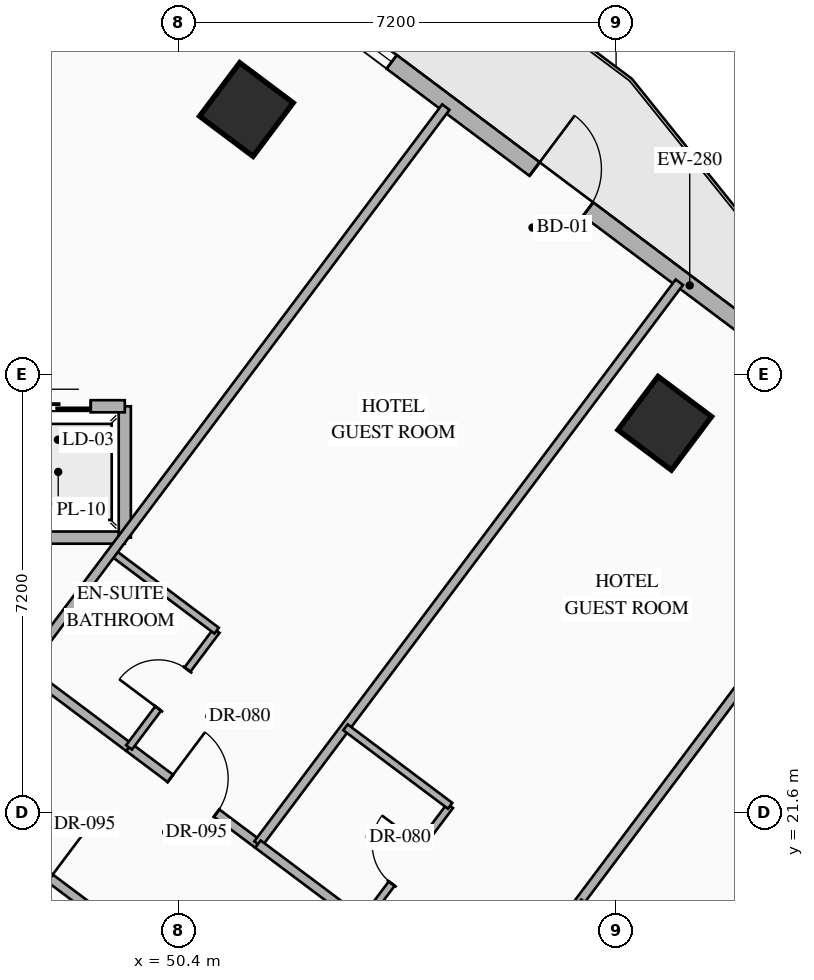
"""IFC4 building model, lengths in metres.
Left out: names, types, materials, properties, quantities, classifications, styles, units other than length and angle.
Written with IfcOpenShell. Run it as: python <this file> out.ifc"""

import sys

from ifc_helpers import new_model, si_unit, direction, frame, frame_2d, origin, origin_2d, place, context, subcontext, project, spatial, rectangle, hollow_rectangle, extrude, element, fill, save


model = new_model("IFC4")
c1 = context("Model", 3, precision=1e-05, world=origin(), true_north=direction((0.0, 1.0)))
c2 = subcontext(c1, "Body", "Model", "MODEL_VIEW")
j1 = project(units=[si_unit("LENGTHUNIT", "METRE"), si_unit("PLANEANGLEUNIT", "RADIAN")], contexts=[c1])
p1 = place(None, origin())
s1 = spatial("IfcSite", under=j1, at=p1, CompositionType="ELEMENT")
p2 = place(p1, origin())
s2 = spatial("IfcBuilding", under=s1, at=p2, CompositionType="ELEMENT")
p3 = place(p2, frame((0.0, 0.0, 63.4)))
s3 = spatial("IfcBuildingStorey", under=s2, at=p3, CompositionType="ELEMENT", Elevation=63.4)
for number, where, z_axis, x_axis in (
    (1, (51.52, 33.16, 0.0), (0.0, 0.0, 1.0), (0.8, -0.6, 0.0)),
    (2, (58.4, 28.0, 0.0), (0.0, 0.0, 1.0), (0.8, -0.6, 0.0)),
):
    element("IfcColumn", number, at=place(p3, frame(where, z_axis=z_axis, x_axis=x_axis)), inside=s3, PredefinedType="COLUMN", context=c2, shape_type="SweptSolid", body=[
        extrude(hollow_rectangle(XDim=1.1, YDim=1.1, WallThickness=0.04, at=origin_2d()), origin(), (0.0, 0.0, 1.0), 3.35),
    ])
p4 = place(p3, frame((44.86, 40.73, 0.0), z_axis=(0.0, 0.0, 1.0), x_axis=(0.800006902154, -0.599990797017, 0.0)))
e3 = element("IfcWall", 3, at=p4, inside=s3, PredefinedType="STANDARD", context=c2, shape_type="SweptSolid", body=[
    extrude(rectangle(XDim=29.712, YDim=0.28, at=frame_2d((14.856, 0.0))), origin(), (0.0, 0.0, 1.0), 3.13),
])
p5 = place(p4, frame((14.249, 0.0, 0.0)))
e4 = element("IfcOpeningElement", 4, at=p5, cuts=e3, PredefinedType="OPENING", context=c2, shape_type="SweptSolid", body=[
    extrude(rectangle(XDim=1.1, YDim=2.2, at=frame_2d((0.55, 1.1))), frame((0.0, 0.15, 0.0), z_axis=(0.0, -1.0, 0.0), x_axis=(1.0, 0.0, 0.0)), (0.0, 0.0, 1.0), 0.3),
])
p6 = place(p4, frame((1.612, 0.0, 0.85)))
e5 = element("IfcOpeningElement", 5, at=p6, cuts=e3, PredefinedType="OPENING", context=c2, shape_type="SweptSolid", body=[
    extrude(rectangle(XDim=1.4, YDim=1.8, at=frame_2d((0.7, 0.9))), frame((0.0, 0.15, 0.0), z_axis=(0.0, -1.0, 0.0), x_axis=(1.0, 0.0, 0.0)), (0.0, 0.0, 1.0), 0.3),
])
p7 = place(p4, frame((5.667, 0.0, 0.85)))
e6 = element("IfcOpeningElement", 6, at=p7, cuts=e3, PredefinedType="OPENING", context=c2, shape_type="SweptSolid", body=[
    extrude(rectangle(XDim=1.4, YDim=1.8, at=frame_2d((0.7, 0.9))), frame((0.0, 0.15, 0.0), z_axis=(0.0, -1.0, 0.0), x_axis=(1.0, 0.0, 0.0)), (0.0, 0.0, 1.0), 0.3),
])
p8 = place(p4, frame((9.912, 0.0, 0.85)))
e7 = element("IfcOpeningElement", 7, at=p8, cuts=e3, PredefinedType="OPENING", context=c2, shape_type="SweptSolid", body=[
    extrude(rectangle(XDim=1.4, YDim=1.8, at=frame_2d((0.7, 0.9))), frame((0.0, 0.15, 0.0), z_axis=(0.0, -1.0, 0.0), x_axis=(1.0, 0.0, 0.0)), (0.0, 0.0, 1.0), 0.3),
])
p9 = place(p4, frame((19.528, 0.0, 0.85)))
e8 = element("IfcOpeningElement", 8, at=p9, cuts=e3, PredefinedType="OPENING", context=c2, shape_type="SweptSolid", body=[
    extrude(rectangle(XDim=1.4, YDim=1.8, at=frame_2d((0.7, 0.9))), frame((0.0, 0.15, 0.0), z_axis=(0.0, -1.0, 0.0), x_axis=(1.0, 0.0, 0.0)), (0.0, 0.0, 1.0), 0.3),
])
p10 = place(p4, frame((23.451, 0.0, 0.85)))
e9 = element("IfcOpeningElement", 9, at=p10, cuts=e3, PredefinedType="OPENING", context=c2, shape_type="SweptSolid", body=[
    extrude(rectangle(XDim=1.4, YDim=1.8, at=frame_2d((0.7, 0.9))), frame((0.0, 0.15, 0.0), z_axis=(0.0, -1.0, 0.0), x_axis=(1.0, 0.0, 0.0)), (0.0, 0.0, 1.0), 0.3),
])
p11 = place(p4, frame((27.852, 0.0, 0.85)))
e10 = element("IfcOpeningElement", 10, at=p11, cuts=e3, PredefinedType="OPENING", context=c2, shape_type="SweptSolid", body=[
    extrude(rectangle(XDim=1.4, YDim=1.8, at=frame_2d((0.7, 0.9))), frame((0.0, 0.15, 0.0), z_axis=(0.0, -1.0, 0.0), x_axis=(1.0, 0.0, 0.0)), (0.0, 0.0, 1.0), 0.3),
])
p12 = place(p3, frame((45.12, 26.12, 0.0), z_axis=(0.0, 0.0, 1.0), x_axis=(1.0, 0.0, 0.0)))
e11 = element("IfcWall", 11, at=p12, inside=s3, PredefinedType="STANDARD", context=c2, shape_type="SweptSolid", body=[
    extrude(rectangle(XDim=4.4, YDim=0.2, at=frame_2d((2.2, 0.0))), origin(), (0.0, 0.0, 1.0), 3.13),
])
p13 = place(p3, frame((49.52, 26.12, 0.0), z_axis=(0.0, 0.0, 1.0), x_axis=(0.0, 1.0, 0.0)))
e12 = element("IfcWall", 12, at=p13, inside=s3, PredefinedType="STANDARD", context=c2, shape_type="SweptSolid", body=[
    extrude(rectangle(XDim=2.16, YDim=0.2, at=frame_2d((1.08, 0.0))), origin(), (0.0, 0.0, 1.0), 3.13),
])
p14 = place(p3, frame((45.12, 28.28, 0.0), z_axis=(0.0, 0.0, 1.0), x_axis=(1.0, 0.0, 0.0)))
e13 = element("IfcWall", 13, at=p14, inside=s3, PredefinedType="STANDARD", context=c2, shape_type="SweptSolid", body=[
    extrude(rectangle(XDim=4.4, YDim=0.2, at=frame_2d((2.2, 0.0))), origin(), (0.0, 0.0, 1.0), 3.13),
])
p15 = place(p14, frame((0.56, 0.0, 0.0)))
e14 = element("IfcOpeningElement", 14, at=p15, cuts=e13, PredefinedType="OPENING", context=c2, shape_type="SweptSolid", body=[
    extrude(rectangle(XDim=1.08, YDim=2.15, at=frame_2d((0.54, 1.075))), frame((0.0, 0.11, 0.0), z_axis=(0.0, -1.0, 0.0), x_axis=(1.0, 0.0, 0.0)), (0.0, 0.0, 1.0), 0.22),
])
p16 = place(p14, frame((2.76, 0.0, 0.0)))
e15 = element("IfcOpeningElement", 15, at=p16, cuts=e13, PredefinedType="OPENING", context=c2, shape_type="SweptSolid", body=[
    extrude(rectangle(XDim=1.08, YDim=2.15, at=frame_2d((0.54, 1.075))), frame((0.0, 0.11, 0.0), z_axis=(0.0, -1.0, 0.0), x_axis=(1.0, 0.0, 0.0)), (0.0, 0.0, 1.0), 0.22),
])
p17 = place(p3, frame((47.87, 23.96, 0.0), z_axis=(0.0, 0.0, 1.0), x_axis=(0.79998637334, -0.60001816845, 0.0)))
e16 = element("IfcWall", 16, at=p17, inside=s3, PredefinedType="PARTITIONING", context=c2, shape_type="SweptSolid", body=[
    extrude(rectangle(XDim=2.15, YDim=0.15, at=frame_2d((1.075, 0.0))), origin(), (0.0, 0.0, 1.0), 2.775),
])
p18 = place(p3, frame((49.59, 22.67, 0.0), z_axis=(0.0, 0.0, 1.0), x_axis=(0.800011056104, -0.599985258246, 0.0)))
e17 = element("IfcWall", 17, at=p18, inside=s3, PredefinedType="PARTITIONING", context=c2, shape_type="SweptSolid", body=[
    extrude(rectangle(XDim=2.65, YDim=0.15, at=frame_2d((1.325, 0.0))), origin(), (0.0, 0.0, 1.0), 2.775),
])
p19 = place(p18, frame((0.85, 0.0, 0.0)))
e18 = element("IfcOpeningElement", 18, at=p19, cuts=e17, PredefinedType="OPENING", context=c2, shape_type="SweptSolid", body=[
    extrude(rectangle(XDim=0.95, YDim=2.15, at=frame_2d((0.475, 1.075))), frame((0.0, 0.085, 0.0), z_axis=(0.0, -1.0, 0.0), x_axis=(1.0, 0.0, 0.0)), (0.0, 0.0, 1.0), 0.17),
])
p20 = place(p3, frame((49.59, 22.67, 0.0), z_axis=(0.0, 0.0, 1.0), x_axis=(0.599951172744, 0.800036618114, 0.0)))
e19 = element("IfcWall", 19, at=p20, inside=s3, PredefinedType="PARTITIONING", context=c2, shape_type="SweptSolid", body=[
    extrude(rectangle(XDim=2.4, YDim=0.12, at=frame_2d((1.2, 0.0))), origin(), (0.0, 0.0, 1.0), 3.13),
])
p21 = place(p20, frame((0.8, 0.0, 0.0)))
e20 = element("IfcOpeningElement", 20, at=p21, cuts=e19, PredefinedType="OPENING", context=c2, shape_type="SweptSolid", body=[
    extrude(rectangle(XDim=0.8, YDim=2.06, at=frame_2d((0.4, 1.03))), frame((0.0, 0.07, 0.0), z_axis=(0.0, -1.0, 0.0), x_axis=(1.0, 0.0, 0.0)), (0.0, 0.0, 1.0), 0.14),
])
p22 = place(p3, frame((49.31, 25.88, 0.0), z_axis=(0.0, 0.0, 1.0), x_axis=(0.800040880289, -0.59994548908, 0.0)))
e21 = element("IfcWall", 21, at=p22, inside=s3, PredefinedType="PARTITIONING", context=c2, shape_type="SweptSolid", body=[
    extrude(rectangle(XDim=2.15, YDim=0.12, at=frame_2d((1.075, 0.0))), origin(), (0.0, 0.0, 1.0), 3.13),
])
for number, where, z_axis, x_axis in (
    (22, (47.87, 23.96, 0.0), (0.0, 0.0, 1.0), (0.6, 0.8, 0.0)),
    (23, (51.71, 21.08, 0.0), (0.0, 0.0, 1.0), (0.6, 0.8, 0.0)),
):
    element("IfcWall", number, at=place(p3, frame(where, z_axis=z_axis, x_axis=x_axis)), inside=s3, PredefinedType="PARTITIONING", context=c2, shape_type="SweptSolid", body=[
        extrude(rectangle(XDim=11.55, YDim=0.15, at=frame_2d((5.775, 0.0))), origin(), (0.0, 0.0, 1.0), 3.13),
    ])
p23 = place(p3, frame((51.71, 21.08, 0.0), z_axis=(0.0, 0.0, 1.0), x_axis=(0.79998637334, -0.60001816845, 0.0)))
e24 = element("IfcWall", 24, at=p23, inside=s3, PredefinedType="PARTITIONING", context=c2, shape_type="SweptSolid", body=[
    extrude(rectangle(XDim=2.15, YDim=0.15, at=frame_2d((1.075, 0.0))), origin(), (0.0, 0.0, 1.0), 2.775),
])
p24 = place(p3, frame((53.43, 19.79, 0.0), z_axis=(0.0, 0.0, 1.0), x_axis=(0.600065100855, 0.79995117022, 0.0)))
e25 = element("IfcWall", 25, at=p24, inside=s3, PredefinedType="PARTITIONING", context=c2, shape_type="SweptSolid", body=[
    extrude(rectangle(XDim=2.4, YDim=0.12, at=frame_2d((1.2, 0.0))), origin(), (0.0, 0.0, 1.0), 3.13),
])
p25 = place(p24, frame((0.8, 0.0, 0.0)))
e26 = element("IfcOpeningElement", 26, at=p25, cuts=e25, PredefinedType="OPENING", context=c2, shape_type="SweptSolid", body=[
    extrude(rectangle(XDim=0.8, YDim=2.06, at=frame_2d((0.4, 1.03))), frame((0.0, 0.07, 0.0), z_axis=(0.0, -1.0, 0.0), x_axis=(1.0, 0.0, 0.0)), (0.0, 0.0, 1.0), 0.14),
])
p26 = place(p3, frame((53.15, 23.0, 0.0), z_axis=(0.0, 0.0, 1.0), x_axis=(0.800027249606, -0.599963665473, 0.0)))
e27 = element("IfcWall", 27, at=p26, inside=s3, PredefinedType="PARTITIONING", context=c2, shape_type="SweptSolid", body=[
    extrude(rectangle(XDim=2.15, YDim=0.12, at=frame_2d((1.075, 0.0))), origin(), (0.0, 0.0, 1.0), 3.13),
])
p27 = place(p3, frame((55.55, 18.2, 0.0), z_axis=(0.0, 0.0, 1.0), x_axis=(0.599996617946, 0.80000253653, 0.0)))
e28 = element("IfcWall", 28, at=p27, inside=s3, PredefinedType="PARTITIONING", context=c2, shape_type="SweptSolid", body=[
    extrude(rectangle(XDim=11.55, YDim=0.15, at=frame_2d((5.775, 0.0))), origin(), (0.0, 0.0, 1.0), 3.13),
])
p28 = place(p3, frame((56.99, 20.12, 0.0), z_axis=(0.0, 0.0, 1.0), x_axis=(0.79998637334, -0.60001816845, 0.0)))
e29 = element("IfcWall", 29, at=p28, inside=s3, PredefinedType="PARTITIONING", context=c2, shape_type="SweptSolid", body=[
    extrude(rectangle(XDim=2.15, YDim=0.12, at=frame_2d((1.075, 0.0))), origin(), (0.0, 0.0, 1.0), 3.13),
])
p29 = place(p3, frame((59.55, 15.2, 0.0), z_axis=(0.0, 0.0, 1.0), x_axis=(0.599996617946, 0.80000253653, 0.0)))
e30 = element("IfcWall", 30, at=p29, inside=s3, PredefinedType="PARTITIONING", context=c2, shape_type="SweptSolid", body=[
    extrude(rectangle(XDim=11.55, YDim=0.15, at=frame_2d((5.775, 0.0))), origin(), (0.0, 0.0, 1.0), 3.13),
])
p30 = place(p3, frame((46.37, 21.96, 0.0), z_axis=(0.0, 0.0, 1.0), x_axis=(0.799977170108, -0.600030438649, 0.0)))
e31 = element("IfcWall", 31, at=p30, inside=s3, PredefinedType="PARTITIONING", context=c2, shape_type="SweptSolid", body=[
    extrude(rectangle(XDim=3.85, YDim=0.15, at=frame_2d((1.925, 0.0))), origin(), (0.0, 0.0, 1.0), 2.425),
])
p31 = place(p30, frame((1.45, 0.0, 0.0)))
e32 = element("IfcOpeningElement", 32, at=p31, cuts=e31, PredefinedType="OPENING", context=c2, shape_type="SweptSolid", body=[
    extrude(rectangle(XDim=0.95, YDim=2.15, at=frame_2d((0.475, 1.075))), frame((0.0, 0.085, 0.0), z_axis=(0.0, -1.0, 0.0), x_axis=(1.0, 0.0, 0.0)), (0.0, 0.0, 1.0), 0.17),
])
p32 = place(p5, origin())
e33 = element("IfcDoor", 33, at=p32, inside=s3, OperationType="SINGLE_SWING_LEFT", PredefinedType="DOOR", context=c2, shape_type="SweptSolid", body=[
    extrude(rectangle(XDim=1.1, YDim=2.2, at=frame_2d((0.55, 1.1))), frame((0.0, 0.025, 0.0), z_axis=(0.0, -1.0, 0.0), x_axis=(1.0, 0.0, 0.0)), (0.0, 0.0, 1.0), 0.05),
])
fill(e4, e33)
p33 = place(p8, origin())
e34 = element("IfcWindow", 34, at=p33, inside=s3, PartitioningType="SINGLE_PANEL", PredefinedType="WINDOW", context=c2, shape_type="SweptSolid", body=[
    extrude(rectangle(XDim=1.4, YDim=1.8, at=frame_2d((0.7, 0.9))), frame((0.0, 0.03, 0.0), z_axis=(0.0, -1.0, 0.0), x_axis=(1.0, 0.0, 0.0)), (0.0, 0.0, 1.0), 0.06),
])
fill(e7, e34)
p34 = place(p16, origin())
e35 = element("IfcDoor", 35, at=p34, inside=s3, OperationType="SLIDING_TO_LEFT", PredefinedType="USERDEFINED", context=c2, shape_type="SweptSolid", body=[
    extrude(rectangle(XDim=1.08, YDim=2.15, at=frame_2d((0.54, 1.075))), frame((0.0, 0.025, 0.0), z_axis=(0.0, -1.0, 0.0), x_axis=(1.0, 0.0, 0.0)), (0.0, 0.0, 1.0), 0.05),
])
fill(e15, e35)
p35 = place(p19, origin())
e36 = element("IfcDoor", 36, at=p35, inside=s3, OperationType="SINGLE_SWING_LEFT", PredefinedType="DOOR", context=c2, shape_type="SweptSolid", body=[
    extrude(rectangle(XDim=0.95, YDim=2.15, at=frame_2d((0.475, 1.075))), frame((0.0, 0.025, 0.0), z_axis=(0.0, -1.0, 0.0), x_axis=(1.0, 0.0, 0.0)), (0.0, 0.0, 1.0), 0.05),
])
fill(e18, e36)
p36 = place(p21, origin())
e37 = element("IfcDoor", 37, at=p36, inside=s3, OperationType="SINGLE_SWING_LEFT", PredefinedType="DOOR", context=c2, shape_type="SweptSolid", body=[
    extrude(rectangle(XDim=0.8, YDim=2.06, at=frame_2d((0.4, 1.03))), frame((0.0, 0.025, 0.0), z_axis=(0.0, -1.0, 0.0), x_axis=(1.0, 0.0, 0.0)), (0.0, 0.0, 1.0), 0.05),
])
fill(e20, e37)
p37 = place(p25, origin())
e38 = element("IfcDoor", 38, at=p37, inside=s3, OperationType="SINGLE_SWING_RIGHT", PredefinedType="DOOR", context=c2, shape_type="SweptSolid", body=[
    extrude(rectangle(XDim=0.8, YDim=2.06, at=frame_2d((0.4, 1.03))), frame((0.0, 0.025, 0.0), z_axis=(0.0, -1.0, 0.0), x_axis=(1.0, 0.0, 0.0)), (0.0, 0.0, 1.0), 0.05),
])
fill(e26, e38)
save(model, sys.argv[1])
